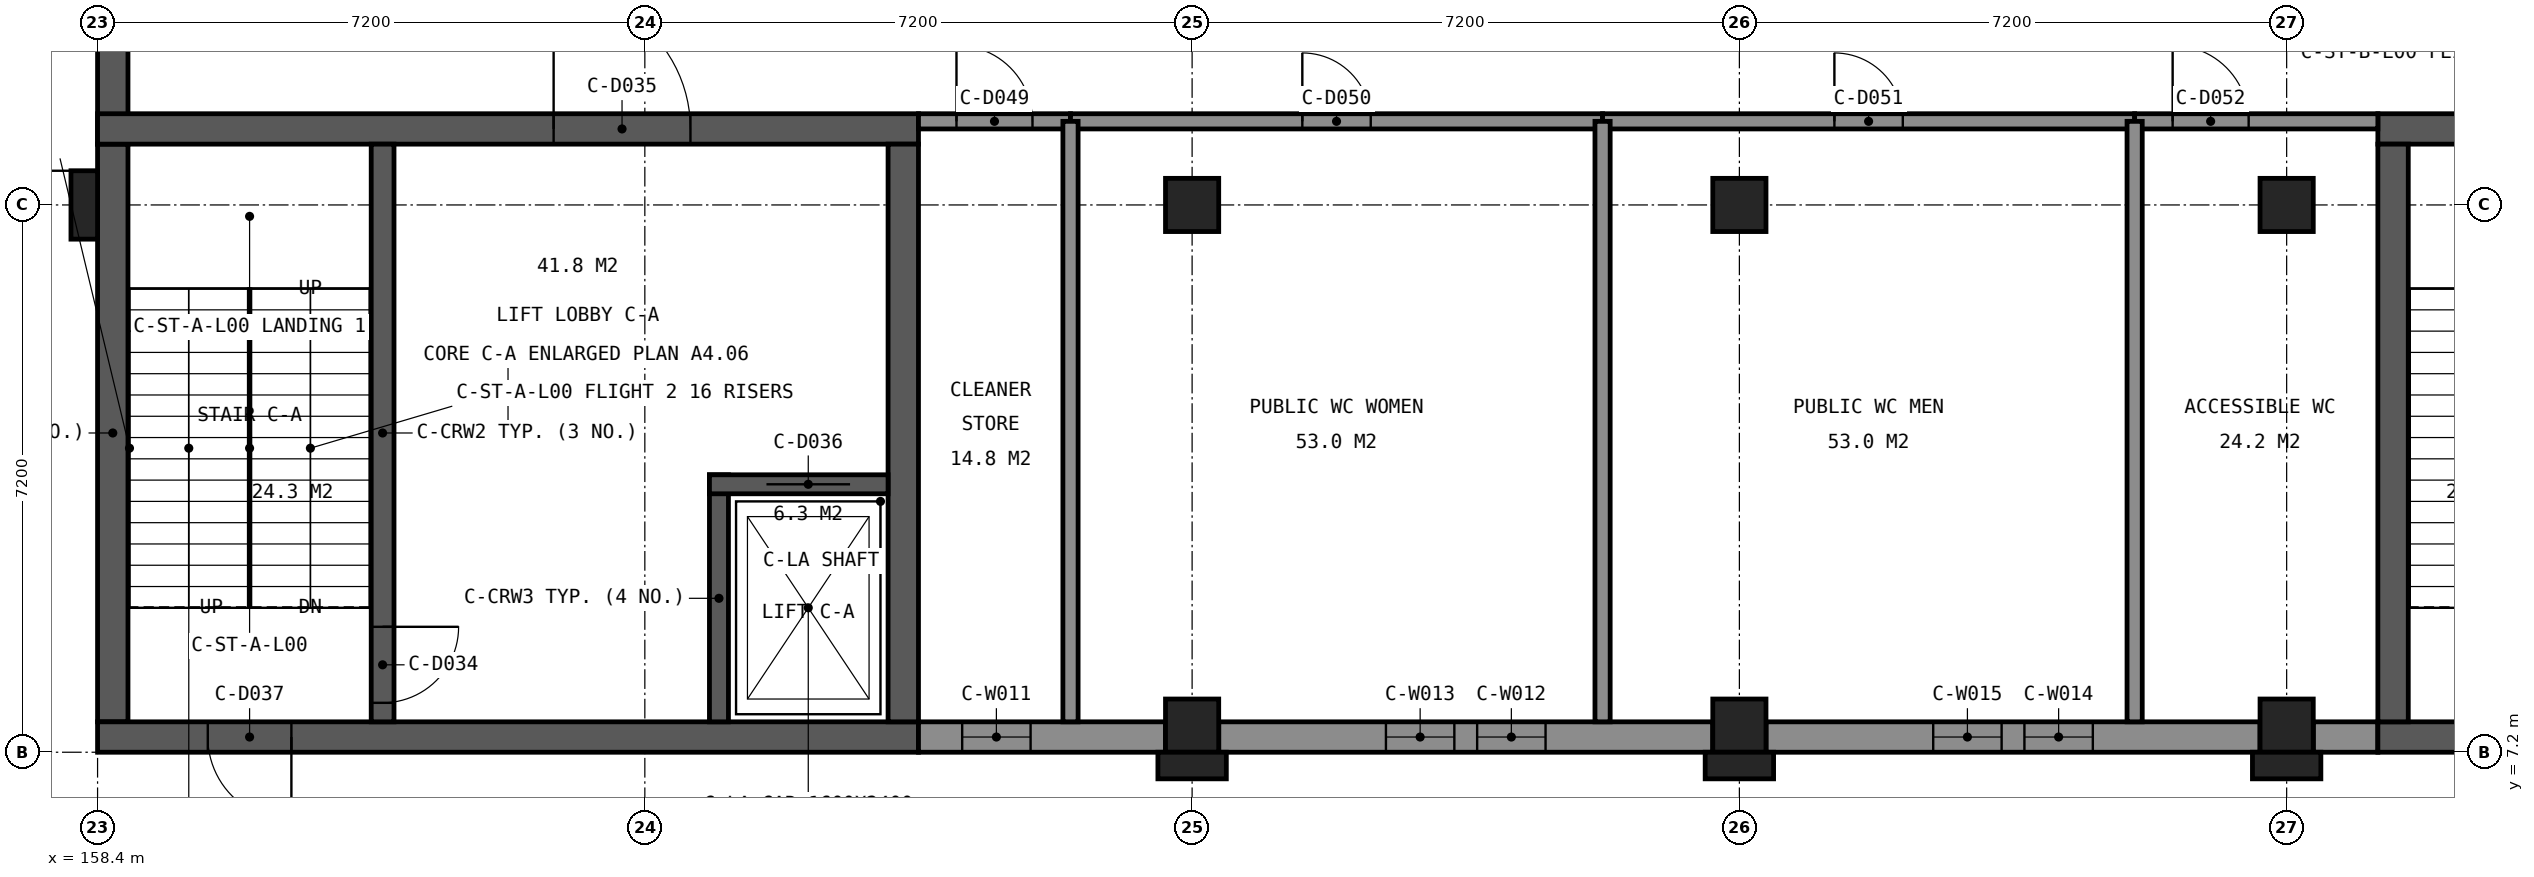
"""IFC4 building model, lengths in metres.
Left out: names, types, materials, properties, quantities, classifications, styles, units other than length and angle.
Written with IfcOpenShell. Run it as: python <this file> out.ifc"""

import sys

from ifc_helpers import new_model, si_unit, direction, frame, frame_2d, origin, origin_2d, place, context, subcontext, project, spatial, rectangle, extrude, element, fill, save


model = new_model("IFC4")
c1 = context("Model", 3, precision=1e-05, world=origin(), true_north=direction((0.0, 1.0)))
c2 = subcontext(c1, "Body", "Model", "MODEL_VIEW")
j1 = project(units=[si_unit("LENGTHUNIT", "METRE"), si_unit("PLANEANGLEUNIT", "RADIAN")], contexts=[c1])
p1 = place(None, origin())
s1 = spatial("IfcSite", under=j1, at=p1, CompositionType="ELEMENT")
p2 = place(p1, origin())
s2 = spatial("IfcBuilding", under=s1, at=p2, CompositionType="ELEMENT")
p3 = place(p2, frame((0.0, 0.0, 4.8)))
s3 = spatial("IfcBuildingStorey", under=s2, at=p3, CompositionType="ELEMENT", Elevation=4.8)
for number, where, z_axis, x_axis in (
    (1, (172.8, 14.4, 0.0), (0.0, 0.0, 1.0), (1.0, 0.0, 0.0)),
    (2, (180.0, 14.4, 0.0), (0.0, 0.0, 1.0), (1.0, 0.0, 0.0)),
    (3, (187.2, 14.4, 0.0), (0.0, 0.0, 1.0), (1.0, 0.0, 0.0)),
    (4, (172.8, 7.55, 0.0), (0.0, 0.0, 1.0), (1.0, 0.0, 0.0)),
    (5, (180.0, 7.55, 0.0), (0.0, 0.0, 1.0), (1.0, 0.0, 0.0)),
    (6, (187.2, 7.55, 0.0), (0.0, 0.0, 1.0), (1.0, 0.0, 0.0)),
):
    element("IfcColumn", number, at=place(p3, frame(where, z_axis=z_axis, x_axis=x_axis)), inside=s3, PredefinedType="COLUMN", context=c2, shape_type="SweptSolid", body=[
        extrude(rectangle(XDim=0.7, YDim=0.7, at=origin_2d()), origin(), (0.0, 0.0, 1.0), 4.8),
    ])
p4 = place(p3, frame((158.6, 15.2, 0.0), z_axis=(0.0, 0.0, 1.0), x_axis=(0.0, 1.0, 0.0)))
e7 = element("IfcWall", 7, at=p4, inside=s3, PredefinedType="SHEAR", context=c2, shape_type="SweptSolid", body=[
    extrude(rectangle(XDim=6.05, YDim=0.4, at=frame_2d((3.025, 0.0))), origin(), (0.0, 0.0, 1.0), 3.95),
])
p5 = place(p4, frame((1.975, 0.0, 1.0)))
e8 = element("IfcOpeningElement", 8, at=p5, cuts=e7, PredefinedType="OPENING", context=c2, shape_type="SweptSolid", body=[
    extrude(rectangle(XDim=0.9, YDim=2.1, at=frame_2d((0.45, 1.05))), frame((0.0, 0.21, 0.0), z_axis=(0.0, -1.0, 0.0), x_axis=(1.0, 0.0, 0.0)), (0.0, 0.0, 1.0), 0.42),
])
p6 = place(p3, frame((158.6, 7.6, 0.0), z_axis=(0.0, 0.0, 1.0), x_axis=(0.0, 1.0, 0.0)))
e9 = element("IfcWall", 9, at=p6, inside=s3, PredefinedType="SHEAR", context=c2, shape_type="SweptSolid", body=[
    extrude(rectangle(XDim=7.6, YDim=0.4, at=frame_2d((3.8, 0.0))), origin(), (0.0, 0.0, 1.0), 4.55),
])
p7 = place(p3, frame((169.2, 7.4, 0.0), z_axis=(0.0, 0.0, 1.0), x_axis=(-1.0, 0.0, 0.0)))
e10 = element("IfcWall", 10, at=p7, inside=s3, PredefinedType="SHEAR", context=c2, shape_type="SweptSolid", body=[
    extrude(rectangle(XDim=10.8, YDim=0.4, at=frame_2d((5.4, 0.0))), origin(), (0.0, 0.0, 1.0), 4.55),
])
p8 = place(p7, frame((8.25, 0.0, 0.0)))
e11 = element("IfcOpeningElement", 11, at=p8, cuts=e10, PredefinedType="OPENING", context=c2, shape_type="SweptSolid", body=[
    extrude(rectangle(XDim=1.1, YDim=2.1, at=frame_2d((0.55, 1.05))), frame((0.0, 0.21, 0.0), z_axis=(0.0, -1.0, 0.0), x_axis=(1.0, 0.0, 0.0)), (0.0, 0.0, 1.0), 0.42),
])
p9 = place(p3, frame((172.45, 7.4, 0.0), z_axis=(0.0, 0.0, 1.0), x_axis=(-1.0, 0.0, 0.0)))
e12 = element("IfcWall", 12, at=p9, inside=s3, PredefinedType="SOLIDWALL", context=c2, shape_type="SweptSolid", body=[
    extrude(rectangle(XDim=3.25, YDim=0.4, at=frame_2d((1.625, 0.0))), origin(), (0.0, 0.0, 1.0), 3.95),
])
p10 = place(p9, frame((1.775, 0.0, 1.0)))
e13 = element("IfcOpeningElement", 13, at=p10, cuts=e12, PredefinedType="OPENING", context=c2, shape_type="SweptSolid", body=[
    extrude(rectangle(XDim=0.9, YDim=2.1, at=frame_2d((0.45, 1.05))), frame((0.0, 0.21, 0.0), z_axis=(0.0, -1.0, 0.0), x_axis=(1.0, 0.0, 0.0)), (0.0, 0.0, 1.0), 0.42),
])
p11 = place(p3, frame((179.65, 7.4, 0.0), z_axis=(0.0, 0.0, 1.0), x_axis=(-1.0, 0.0, 0.0)))
e14 = element("IfcWall", 14, at=p11, inside=s3, PredefinedType="SOLIDWALL", context=c2, shape_type="SweptSolid", body=[
    extrude(rectangle(XDim=6.5, YDim=0.4, at=frame_2d((3.25, 0.0))), origin(), (0.0, 0.0, 1.0), 3.95),
])
p12 = place(p11, frame((2.2, 0.0, 1.0)))
e15 = element("IfcOpeningElement", 15, at=p12, cuts=e14, PredefinedType="OPENING", context=c2, shape_type="SweptSolid", body=[
    extrude(rectangle(XDim=0.9, YDim=2.1, at=frame_2d((0.45, 1.05))), frame((0.0, 0.21, 0.0), z_axis=(0.0, -1.0, 0.0), x_axis=(1.0, 0.0, 0.0)), (0.0, 0.0, 1.0), 0.42),
])
p13 = place(p11, frame((3.4, 0.0, 1.0)))
e16 = element("IfcOpeningElement", 16, at=p13, cuts=e14, PredefinedType="OPENING", context=c2, shape_type="SweptSolid", body=[
    extrude(rectangle(XDim=0.9, YDim=2.1, at=frame_2d((0.45, 1.05))), frame((0.0, 0.21, 0.0), z_axis=(0.0, -1.0, 0.0), x_axis=(1.0, 0.0, 0.0)), (0.0, 0.0, 1.0), 0.42),
])
p14 = place(p3, frame((186.85, 7.4, 0.0), z_axis=(0.0, 0.0, 1.0), x_axis=(-1.0, 0.0, 0.0)))
e17 = element("IfcWall", 17, at=p14, inside=s3, PredefinedType="SOLIDWALL", context=c2, shape_type="SweptSolid", body=[
    extrude(rectangle(XDim=6.5, YDim=0.4, at=frame_2d((3.25, 0.0))), origin(), (0.0, 0.0, 1.0), 3.95),
])
p15 = place(p14, frame((2.2, 0.0, 1.0)))
e18 = element("IfcOpeningElement", 18, at=p15, cuts=e17, PredefinedType="OPENING", context=c2, shape_type="SweptSolid", body=[
    extrude(rectangle(XDim=0.9, YDim=2.1, at=frame_2d((0.45, 1.05))), frame((0.0, 0.21, 0.0), z_axis=(0.0, -1.0, 0.0), x_axis=(1.0, 0.0, 0.0)), (0.0, 0.0, 1.0), 0.42),
])
p16 = place(p14, frame((3.4, 0.0, 1.0)))
e19 = element("IfcOpeningElement", 19, at=p16, cuts=e17, PredefinedType="OPENING", context=c2, shape_type="SweptSolid", body=[
    extrude(rectangle(XDim=0.9, YDim=2.1, at=frame_2d((0.45, 1.05))), frame((0.0, 0.21, 0.0), z_axis=(0.0, -1.0, 0.0), x_axis=(1.0, 0.0, 0.0)), (0.0, 0.0, 1.0), 0.42),
])
p17 = place(p3, frame((188.4, 7.4, 0.0), z_axis=(0.0, 0.0, 1.0), x_axis=(-1.0, 0.0, 0.0)))
e20 = element("IfcWall", 20, at=p17, inside=s3, PredefinedType="SOLIDWALL", context=c2, shape_type="SweptSolid", body=[
    extrude(rectangle(XDim=0.85, YDim=0.4, at=frame_2d((0.425, 0.0))), origin(), (0.0, 0.0, 1.0), 3.95),
])
p18 = place(p3, frame((199.2, 7.4, 0.0), z_axis=(0.0, 0.0, 1.0), x_axis=(-1.0, 0.0, 0.0)))
e21 = element("IfcWall", 21, at=p18, inside=s3, PredefinedType="SHEAR", context=c2, shape_type="SweptSolid", body=[
    extrude(rectangle(XDim=10.8, YDim=0.4, at=frame_2d((5.4, 0.0))), origin(), (0.0, 0.0, 1.0), 4.55),
])
p19 = place(p18, frame((8.25, 0.0, 0.0)))
e22 = element("IfcOpeningElement", 22, at=p19, cuts=e21, PredefinedType="OPENING", context=c2, shape_type="SweptSolid", body=[
    extrude(rectangle(XDim=1.1, YDim=2.1, at=frame_2d((0.55, 1.05))), frame((0.0, 0.21, 0.0), z_axis=(0.0, -1.0, 0.0), x_axis=(1.0, 0.0, 0.0)), (0.0, 0.0, 1.0), 0.42),
])
p20 = place(p3, frame((158.4, 15.4, 0.0), z_axis=(0.0, 0.0, 1.0), x_axis=(1.0, 0.0, 0.0)))
e23 = element("IfcWall", 23, at=p20, inside=s3, PredefinedType="SHEAR", context=c2, shape_type="SweptSolid", body=[
    extrude(rectangle(XDim=10.8, YDim=0.4, at=frame_2d((5.4, 0.0))), origin(), (0.0, 0.0, 1.0), 4.55),
])
p21 = place(p20, frame((6.0, 0.0, 0.0)))
e24 = element("IfcOpeningElement", 24, at=p21, cuts=e23, PredefinedType="OPENING", context=c2, shape_type="SweptSolid", body=[
    extrude(rectangle(XDim=1.8, YDim=2.1, at=frame_2d((0.9, 1.05))), frame((0.0, 0.21, 0.0), z_axis=(0.0, -1.0, 0.0), x_axis=(1.0, 0.0, 0.0)), (0.0, 0.0, 1.0), 0.42),
])
p22 = place(p3, frame((169.0, 15.2, 0.0), z_axis=(0.0, 0.0, 1.0), x_axis=(0.0, -1.0, 0.0)))
e25 = element("IfcWall", 25, at=p22, inside=s3, PredefinedType="SHEAR", context=c2, shape_type="SweptSolid", body=[
    extrude(rectangle(XDim=7.6, YDim=0.4, at=frame_2d((3.8, 0.0))), origin(), (0.0, 0.0, 1.0), 4.55),
])
p23 = place(p3, frame((162.15, 15.2, 0.0), z_axis=(0.0, 0.0, 1.0), x_axis=(0.0, -1.0, 0.0)))
e26 = element("IfcWall", 26, at=p23, inside=s3, PredefinedType="SHEAR", context=c2, shape_type="SweptSolid", body=[
    extrude(rectangle(XDim=7.6, YDim=0.3, at=frame_2d((3.8, 0.0))), origin(), (0.0, 0.0, 1.0), 4.55),
])
p24 = place(p23, frame((6.35, 0.0, 0.0)))
e27 = element("IfcOpeningElement", 27, at=p24, cuts=e26, PredefinedType="OPENING", context=c2, shape_type="SweptSolid", body=[
    extrude(rectangle(XDim=1.0, YDim=2.1, at=frame_2d((0.5, 1.05))), frame((0.0, 0.16, 0.0), z_axis=(0.0, -1.0, 0.0), x_axis=(1.0, 0.0, 0.0)), (0.0, 0.0, 1.0), 0.32),
])
p25 = place(p3, frame((166.575, 10.85, 0.0), z_axis=(0.0, 0.0, 1.0), x_axis=(0.0, -1.0, 0.0)))
e28 = element("IfcWall", 28, at=p25, inside=s3, PredefinedType="SHEAR", context=c2, shape_type="SweptSolid", body=[
    extrude(rectangle(XDim=3.25, YDim=0.25, at=frame_2d((1.625, 0.0))), origin(), (0.0, 0.0, 1.0), 4.55),
])
p26 = place(p3, frame((166.45, 10.725, 0.0), z_axis=(0.0, 0.0, 1.0), x_axis=(1.0, 0.0, 0.0)))
e29 = element("IfcWall", 29, at=p26, inside=s3, PredefinedType="SHEAR", context=c2, shape_type="SweptSolid", body=[
    extrude(rectangle(XDim=2.35, YDim=0.25, at=frame_2d((1.175, 0.0))), origin(), (0.0, 0.0, 1.0), 4.55),
])
p27 = place(p26, frame((0.75, 0.0, 0.0)))
e30 = element("IfcOpeningElement", 30, at=p27, cuts=e29, PredefinedType="OPENING", context=c2, shape_type="SweptSolid", body=[
    extrude(rectangle(XDim=1.1, YDim=2.1, at=frame_2d((0.55, 1.05))), frame((0.0, 0.135, 0.0), z_axis=(0.0, -1.0, 0.0), x_axis=(1.0, 0.0, 0.0)), (0.0, 0.0, 1.0), 0.27),
])
p28 = place(p3, frame((188.4, 15.4, 0.0), z_axis=(0.0, 0.0, 1.0), x_axis=(1.0, 0.0, 0.0)))
e31 = element("IfcWall", 31, at=p28, inside=s3, PredefinedType="SHEAR", context=c2, shape_type="SweptSolid", body=[
    extrude(rectangle(XDim=10.8, YDim=0.4, at=frame_2d((5.4, 0.0))), origin(), (0.0, 0.0, 1.0), 4.55),
])
p29 = place(p28, frame((6.0, 0.0, 0.0)))
e32 = element("IfcOpeningElement", 32, at=p29, cuts=e31, PredefinedType="OPENING", context=c2, shape_type="SweptSolid", body=[
    extrude(rectangle(XDim=1.8, YDim=2.1, at=frame_2d((0.9, 1.05))), frame((0.0, 0.21, 0.0), z_axis=(0.0, -1.0, 0.0), x_axis=(1.0, 0.0, 0.0)), (0.0, 0.0, 1.0), 0.42),
])
p30 = place(p3, frame((188.6, 15.2, 0.0), z_axis=(0.0, 0.0, 1.0), x_axis=(0.0, -1.0, 0.0)))
e33 = element("IfcWall", 33, at=p30, inside=s3, PredefinedType="SHEAR", context=c2, shape_type="SweptSolid", body=[
    extrude(rectangle(XDim=7.6, YDim=0.4, at=frame_2d((3.8, 0.0))), origin(), (0.0, 0.0, 1.0), 4.55),
])
for number, where, z_axis, x_axis in (
    (34, (172.8, 7.025, 0.0), (0.0, 0.0, 1.0), (1.0, 0.0, 0.0)),
    (35, (180.0, 7.025, 0.0), (0.0, 0.0, 1.0), (1.0, 0.0, 0.0)),
    (36, (187.2, 7.025, 0.0), (0.0, 0.0, 1.0), (1.0, 0.0, 0.0)),
    (37, (158.225, 14.4, 0.0), (0.0, 0.0, 1.0), (0.0, 1.0, 0.0)),
):
    element("IfcColumn", number, at=place(p3, frame(where, z_axis=z_axis, x_axis=x_axis)), inside=s3, PredefinedType="PILASTER", context=c2, shape_type="SweptSolid", body=[
        extrude(rectangle(XDim=0.9, YDim=0.35, at=origin_2d()), origin(), (0.0, 0.0, 1.0), 4.8),
    ])
p31 = place(p3, frame((169.2, 15.5, 0.0), z_axis=(0.0, 0.0, 1.0), x_axis=(1.0, 0.0, 0.0)))
e38 = element("IfcWall", 38, at=p31, inside=s3, PredefinedType="PARTITIONING", context=c2, shape_type="SweptSolid", body=[
    extrude(rectangle(XDim=2.0, YDim=0.2, at=frame_2d((1.0, 0.0))), origin(), (0.0, 0.0, 1.0), 3.95),
])
p32 = place(p31, frame((0.5, 0.0, 0.0)))
e39 = element("IfcOpeningElement", 39, at=p32, cuts=e38, PredefinedType="OPENING", context=c2, shape_type="SweptSolid", body=[
    extrude(rectangle(XDim=1.0, YDim=2.1, at=frame_2d((0.5, 1.05))), frame((0.0, 0.11, 0.0), z_axis=(0.0, -1.0, 0.0), x_axis=(1.0, 0.0, 0.0)), (0.0, 0.0, 1.0), 0.22),
])
p33 = place(p3, frame((171.2, 15.5, 0.0), z_axis=(0.0, 0.0, 1.0), x_axis=(1.0, 0.0, 0.0)))
e40 = element("IfcWall", 40, at=p33, inside=s3, PredefinedType="PARTITIONING", context=c2, shape_type="SweptSolid", body=[
    extrude(rectangle(XDim=7.0, YDim=0.2, at=frame_2d((3.5, 0.0))), origin(), (0.0, 0.0, 1.0), 3.95),
])
p34 = place(p33, frame((3.05, 0.0, 0.0)))
e41 = element("IfcOpeningElement", 41, at=p34, cuts=e40, PredefinedType="OPENING", context=c2, shape_type="SweptSolid", body=[
    extrude(rectangle(XDim=0.9, YDim=2.1, at=frame_2d((0.45, 1.05))), frame((0.0, 0.11, 0.0), z_axis=(0.0, -1.0, 0.0), x_axis=(1.0, 0.0, 0.0)), (0.0, 0.0, 1.0), 0.22),
])
p35 = place(p3, frame((178.2, 15.5, 0.0), z_axis=(0.0, 0.0, 1.0), x_axis=(1.0, 0.0, 0.0)))
e42 = element("IfcWall", 42, at=p35, inside=s3, PredefinedType="PARTITIONING", context=c2, shape_type="SweptSolid", body=[
    extrude(rectangle(XDim=7.0, YDim=0.2, at=frame_2d((3.5, 0.0))), origin(), (0.0, 0.0, 1.0), 3.95),
])
p36 = place(p35, frame((3.05, 0.0, 0.0)))
e43 = element("IfcOpeningElement", 43, at=p36, cuts=e42, PredefinedType="OPENING", context=c2, shape_type="SweptSolid", body=[
    extrude(rectangle(XDim=0.9, YDim=2.1, at=frame_2d((0.45, 1.05))), frame((0.0, 0.11, 0.0), z_axis=(0.0, -1.0, 0.0), x_axis=(1.0, 0.0, 0.0)), (0.0, 0.0, 1.0), 0.22),
])
p37 = place(p3, frame((185.2, 15.5, 0.0), z_axis=(0.0, 0.0, 1.0), x_axis=(1.0, 0.0, 0.0)))
e44 = element("IfcWall", 44, at=p37, inside=s3, PredefinedType="PARTITIONING", context=c2, shape_type="SweptSolid", body=[
    extrude(rectangle(XDim=3.2, YDim=0.2, at=frame_2d((1.6, 0.0))), origin(), (0.0, 0.0, 1.0), 3.95),
])
p38 = place(p37, frame((0.5, 0.0, 0.0)))
e45 = element("IfcOpeningElement", 45, at=p38, cuts=e44, PredefinedType="OPENING", context=c2, shape_type="SweptSolid", body=[
    extrude(rectangle(XDim=1.0, YDim=2.1, at=frame_2d((0.5, 1.05))), frame((0.0, 0.11, 0.0), z_axis=(0.0, -1.0, 0.0), x_axis=(1.0, 0.0, 0.0)), (0.0, 0.0, 1.0), 0.22),
])
for number, where, z_axis, x_axis in (
    (46, (171.2, 15.5, 0.0), (0.0, 0.0, 1.0), (0.0, -1.0, 0.0)),
    (47, (178.2, 15.5, 0.0), (0.0, 0.0, 1.0), (0.0, -1.0, 0.0)),
    (48, (185.2, 15.5, 0.0), (0.0, 0.0, 1.0), (0.0, -1.0, 0.0)),
):
    element("IfcWall", number, at=place(p3, frame(where, z_axis=z_axis, x_axis=x_axis)), inside=s3, PredefinedType="PARTITIONING", context=c2, shape_type="SweptSolid", body=[
        extrude(rectangle(XDim=7.9, YDim=0.2, at=frame_2d((3.95, 0.0))), origin(), (0.0, 0.0, 1.0), 3.95),
    ])
p39 = place(p10, origin())
e49 = element("IfcWindow", 49, at=p39, inside=s3, PartitioningType="SINGLE_PANEL", PredefinedType="WINDOW", context=c2, shape_type="SweptSolid", body=[
    extrude(rectangle(XDim=0.9, YDim=2.1, at=frame_2d((0.45, 1.05))), frame((0.0, -0.09, 0.0), z_axis=(0.0, -1.0, 0.0), x_axis=(1.0, 0.0, 0.0)), (0.0, 0.0, 1.0), 0.06),
])
fill(e13, e49)
p40 = place(p12, origin())
e50 = element("IfcWindow", 50, at=p40, inside=s3, PartitioningType="SINGLE_PANEL", PredefinedType="WINDOW", context=c2, shape_type="SweptSolid", body=[
    extrude(rectangle(XDim=0.9, YDim=2.1, at=frame_2d((0.45, 1.05))), frame((0.0, -0.09, 0.0), z_axis=(0.0, -1.0, 0.0), x_axis=(1.0, 0.0, 0.0)), (0.0, 0.0, 1.0), 0.06),
])
fill(e15, e50)
p41 = place(p13, origin())
e51 = element("IfcWindow", 51, at=p41, inside=s3, PartitioningType="SINGLE_PANEL", PredefinedType="WINDOW", context=c2, shape_type="SweptSolid", body=[
    extrude(rectangle(XDim=0.9, YDim=2.1, at=frame_2d((0.45, 1.05))), frame((0.0, -0.09, 0.0), z_axis=(0.0, -1.0, 0.0), x_axis=(1.0, 0.0, 0.0)), (0.0, 0.0, 1.0), 0.06),
])
fill(e16, e51)
p42 = place(p15, origin())
e52 = element("IfcWindow", 52, at=p42, inside=s3, PartitioningType="SINGLE_PANEL", PredefinedType="WINDOW", context=c2, shape_type="SweptSolid", body=[
    extrude(rectangle(XDim=0.9, YDim=2.1, at=frame_2d((0.45, 1.05))), frame((0.0, -0.09, 0.0), z_axis=(0.0, -1.0, 0.0), x_axis=(1.0, 0.0, 0.0)), (0.0, 0.0, 1.0), 0.06),
])
fill(e18, e52)
p43 = place(p16, origin())
e53 = element("IfcWindow", 53, at=p43, inside=s3, PartitioningType="SINGLE_PANEL", PredefinedType="WINDOW", context=c2, shape_type="SweptSolid", body=[
    extrude(rectangle(XDim=0.9, YDim=2.1, at=frame_2d((0.45, 1.05))), frame((0.0, -0.09, 0.0), z_axis=(0.0, -1.0, 0.0), x_axis=(1.0, 0.0, 0.0)), (0.0, 0.0, 1.0), 0.06),
])
fill(e19, e53)
p44 = place(p24, origin())
e54 = element("IfcDoor", 54, at=p44, inside=s3, OperationType="NOTDEFINED", PredefinedType="DOOR", context=c2, shape_type="SweptSolid", body=[
    extrude(rectangle(XDim=1.0, YDim=2.1, at=frame_2d((0.5, 1.05))), frame((0.0, 0.025, 0.0), z_axis=(0.0, -1.0, 0.0), x_axis=(1.0, 0.0, 0.0)), (0.0, 0.0, 1.0), 0.05),
])
fill(e27, e54)
p45 = place(p21, origin())
e55 = element("IfcDoor", 55, at=p45, inside=s3, OperationType="NOTDEFINED", PredefinedType="DOOR", context=c2, shape_type="SweptSolid", body=[
    extrude(rectangle(XDim=1.8, YDim=2.1, at=frame_2d((0.9, 1.05))), frame((0.0, 0.025, 0.0), z_axis=(0.0, -1.0, 0.0), x_axis=(1.0, 0.0, 0.0)), (0.0, 0.0, 1.0), 0.05),
])
fill(e24, e55)
p46 = place(p27, origin())
e56 = element("IfcDoor", 56, at=p46, inside=s3, OperationType="SLIDING_TO_LEFT", PredefinedType="DOOR", context=c2, shape_type="SweptSolid", body=[
    extrude(rectangle(XDim=1.1, YDim=2.1, at=frame_2d((0.55, 1.05))), frame((0.0, 0.025, 0.0), z_axis=(0.0, -1.0, 0.0), x_axis=(1.0, 0.0, 0.0)), (0.0, 0.0, 1.0), 0.05),
])
fill(e30, e56)
p47 = place(p8, origin())
e57 = element("IfcDoor", 57, at=p47, inside=s3, OperationType="NOTDEFINED", PredefinedType="DOOR", context=c2, shape_type="SweptSolid", body=[
    extrude(rectangle(XDim=1.1, YDim=2.1, at=frame_2d((0.55, 1.05))), frame((0.0, 0.025, 0.0), z_axis=(0.0, -1.0, 0.0), x_axis=(1.0, 0.0, 0.0)), (0.0, 0.0, 1.0), 0.05),
])
fill(e11, e57)
p48 = place(p32, origin())
e58 = element("IfcDoor", 58, at=p48, inside=s3, OperationType="NOTDEFINED", PredefinedType="DOOR", context=c2, shape_type="SweptSolid", body=[
    extrude(rectangle(XDim=1.0, YDim=2.1, at=frame_2d((0.5, 1.05))), frame((0.0, 0.025, 0.0), z_axis=(0.0, -1.0, 0.0), x_axis=(1.0, 0.0, 0.0)), (0.0, 0.0, 1.0), 0.05),
])
fill(e39, e58)
p49 = place(p34, origin())
e59 = element("IfcDoor", 59, at=p49, inside=s3, OperationType="NOTDEFINED", PredefinedType="DOOR", context=c2, shape_type="SweptSolid", body=[
    extrude(rectangle(XDim=0.9, YDim=2.1, at=frame_2d((0.45, 1.05))), frame((0.0, 0.025, 0.0), z_axis=(0.0, -1.0, 0.0), x_axis=(1.0, 0.0, 0.0)), (0.0, 0.0, 1.0), 0.05),
])
fill(e41, e59)
p50 = place(p36, origin())
e60 = element("IfcDoor", 60, at=p50, inside=s3, OperationType="NOTDEFINED", PredefinedType="DOOR", context=c2, shape_type="SweptSolid", body=[
    extrude(rectangle(XDim=0.9, YDim=2.1, at=frame_2d((0.45, 1.05))), frame((0.0, 0.025, 0.0), z_axis=(0.0, -1.0, 0.0), x_axis=(1.0, 0.0, 0.0)), (0.0, 0.0, 1.0), 0.05),
])
fill(e43, e60)
p51 = place(p38, origin())
e61 = element("IfcDoor", 61, at=p51, inside=s3, OperationType="NOTDEFINED", PredefinedType="DOOR", context=c2, shape_type="SweptSolid", body=[
    extrude(rectangle(XDim=1.0, YDim=2.1, at=frame_2d((0.5, 1.05))), frame((0.0, 0.025, 0.0), z_axis=(0.0, -1.0, 0.0), x_axis=(1.0, 0.0, 0.0)), (0.0, 0.0, 1.0), 0.05),
])
fill(e45, e61)
save(model, sys.argv[1])
